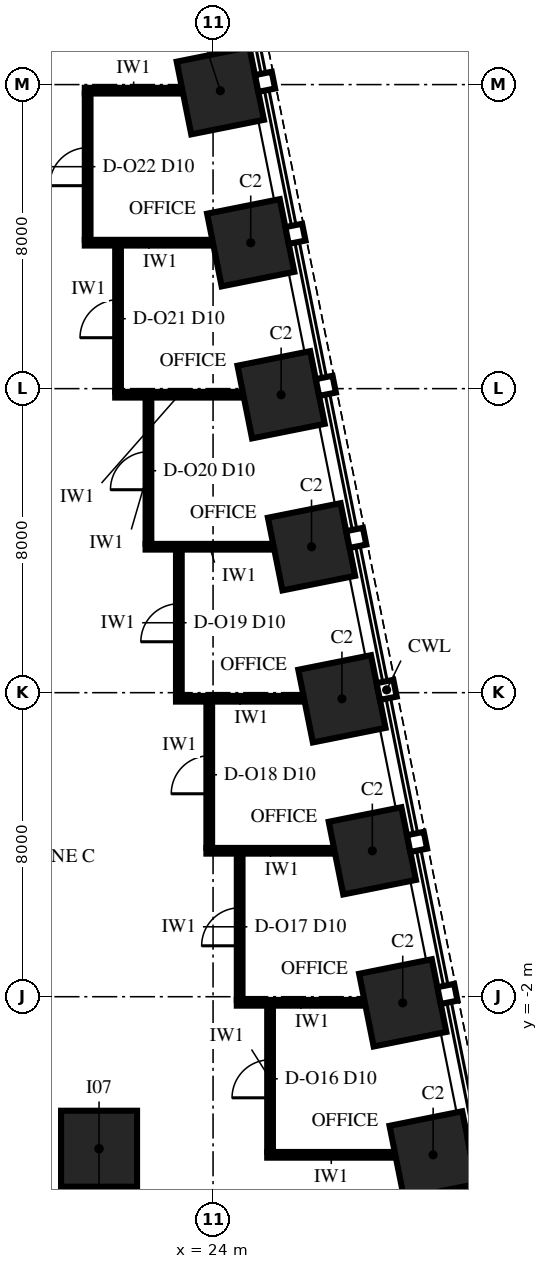
"""IFC4 building model, lengths in metres.
Left out: names, types, materials, properties, quantities, classifications, styles, units other than length and angle.
Written with IfcOpenShell. Run it as: python <this file> out.ifc"""

import sys

from ifc_helpers import new_model, si_unit, direction, frame, frame_2d, origin, origin_2d, place, context, subcontext, project, spatial, rectangle, extrude, element, fill, save


model = new_model("IFC4")
c1 = context("Model", 3, precision=1e-05, world=origin(), true_north=direction((0.0, 1.0)))
c2 = subcontext(c1, "Body", "Model", "MODEL_VIEW")
j1 = project(units=[si_unit("LENGTHUNIT", "METRE"), si_unit("PLANEANGLEUNIT", "RADIAN")], contexts=[c1])
p1 = place(None, origin())
s1 = spatial("IfcSite", under=j1, at=p1, CompositionType="ELEMENT")
p2 = place(p1, origin())
s2 = spatial("IfcBuilding", under=s1, at=p2, CompositionType="ELEMENT")
p3 = place(p2, frame((0.0, 0.0, 88.0)))
s3 = spatial("IfcBuildingStorey", under=s2, at=p3, CompositionType="ELEMENT", Elevation=88.0)
for number, where, z_axis, x_axis in (
    (1, (29.791, -6.162, 0.0), (0.0, 0.0, 1.0), (-0.196, 0.981, 0.0)),
    (2, (28.991, -2.162, 0.0), (0.0, 0.0, 1.0), (-0.196, 0.981, 0.0)),
    (3, (28.191, 1.838, 0.0), (0.0, 0.0, 1.0), (-0.196, 0.981, 0.0)),
    (4, (27.391, 5.838, 0.0), (0.0, 0.0, 1.0), (-0.196, 0.981, 0.0)),
    (5, (26.591, 9.838, 0.0), (0.0, 0.0, 1.0), (-0.196, 0.981, 0.0)),
    (6, (25.791, 13.838, 0.0), (0.0, 0.0, 1.0), (-0.196, 0.981, 0.0)),
    (7, (24.991, 17.838, 0.0), (0.0, 0.0, 1.0), (-0.196, 0.981, 0.0)),
    (8, (24.191, 21.838, 0.0), (0.0, 0.0, 1.0), (-0.196, 0.981, 0.0)),
):
    element("IfcColumn", number, at=place(p3, frame(where, z_axis=z_axis, x_axis=x_axis)), inside=s3, PredefinedType="COLUMN", context=c2, shape_type="SweptSolid", body=[
        extrude(rectangle(XDim=1.95, YDim=1.95, at=origin_2d()), origin(), (0.0, 0.0, 1.0), 4.0),
    ])
p4 = place(p3, frame((21.0, -6.0, 0.0), z_axis=(0.0, 0.0, 1.0), x_axis=(1.0, 0.0, 0.0)))
e9 = element("IfcColumn", 9, at=p4, inside=s3, PredefinedType="COLUMN", context=c2, shape_type="SweptSolid", body=[
    extrude(rectangle(XDim=2.0, YDim=2.0, at=origin_2d()), origin(), (0.0, 0.0, 1.0), 4.0),
])
p5 = place(p3, frame((25.425, -6.16, 0.0), z_axis=(0.0, 0.0, 1.0), x_axis=(1.0, 0.0, 0.0)))
e10 = element("IfcWall", 10, at=p5, inside=s3, PredefinedType="PARTITIONING", context=c2, shape_type="SweptSolid", body=[
    extrude(rectangle(XDim=3.371, YDim=0.15, at=frame_2d((1.686, 0.0))), origin(), (0.0, 0.0, 1.0), 2.742),
])
for number, where, z_axis, x_axis in (
    (11, (24.625, -2.16, 0.0), (0.0, 0.0, 1.0), (1.0, 0.0, 0.0)),
    (12, (23.825, 1.84, 0.0), (0.0, 0.0, 1.0), (1.0, 0.0, 0.0)),
):
    element("IfcWall", number, at=place(p3, frame(where, z_axis=z_axis, x_axis=x_axis)), inside=s3, PredefinedType="PARTITIONING", context=c2, shape_type="SweptSolid", body=[
        extrude(rectangle(XDim=3.371, YDim=0.15, at=frame_2d((1.686, 0.0))), origin(), (0.0, 0.0, 1.0), 3.13),
    ])
p6 = place(p3, frame((23.025, 5.84, 0.0), z_axis=(0.0, 0.0, 1.0), x_axis=(1.0, 0.0, 0.0)))
e13 = element("IfcWall", 13, at=p6, inside=s3, PredefinedType="PARTITIONING", context=c2, shape_type="SweptSolid", body=[
    extrude(rectangle(XDim=3.372, YDim=0.15, at=frame_2d((1.686, 0.0))), origin(), (0.0, 0.0, 1.0), 2.742),
])
for number, where, z_axis, x_axis in (
    (14, (22.225, 9.84, 0.0), (0.0, 0.0, 1.0), (1.0, 0.0, 0.0)),
    (15, (21.425, 13.84, 0.0), (0.0, 0.0, 1.0), (1.0, 0.0, 0.0)),
    (16, (20.625, 17.84, 0.0), (0.0, 0.0, 1.0), (1.0, 0.0, 0.0)),
):
    element("IfcWall", number, at=place(p3, frame(where, z_axis=z_axis, x_axis=x_axis)), inside=s3, PredefinedType="PARTITIONING", context=c2, shape_type="SweptSolid", body=[
        extrude(rectangle(XDim=3.371, YDim=0.15, at=frame_2d((1.686, 0.0))), origin(), (0.0, 0.0, 1.0), 3.13),
    ])
p7 = place(p3, frame((20.625, 21.84, 0.0), z_axis=(0.0, 0.0, 1.0), x_axis=(1.0, 0.0, 0.0)))
e17 = element("IfcWall", 17, at=p7, inside=s3, PredefinedType="PARTITIONING", context=c2, shape_type="SweptSolid", body=[
    extrude(rectangle(XDim=2.571, YDim=0.15, at=frame_2d((1.286, 0.0))), origin(), (0.0, 0.0, 1.0), 3.13),
])
p8 = place(p3, frame((20.7, 17.915, 0.0), z_axis=(0.0, 0.0, 1.0), x_axis=(0.0, 1.0, 0.0)))
e18 = element("IfcWall", 18, at=p8, inside=s3, PredefinedType="PARTITIONING", context=c2, shape_type="SweptSolid", body=[
    extrude(rectangle(XDim=3.85, YDim=0.15, at=frame_2d((1.925, 0.0))), origin(), (0.0, 0.0, 1.0), 3.13),
])
p9 = place(p8, frame((1.425, 0.0, 0.0)))
e19 = element("IfcOpeningElement", 19, at=p9, cuts=e18, PredefinedType="OPENING", context=c2, shape_type="SweptSolid", body=[
    extrude(rectangle(XDim=1.0, YDim=2.3, at=frame_2d((0.5, 1.15))), frame((0.0, 0.09, 0.0), z_axis=(0.0, -1.0, 0.0), x_axis=(1.0, 0.0, 0.0)), (0.0, 0.0, 1.0), 0.18),
])
p10 = place(p3, frame((21.5, 13.915, 0.0), z_axis=(0.0, 0.0, 1.0), x_axis=(0.0, 1.0, 0.0)))
e20 = element("IfcWall", 20, at=p10, inside=s3, PredefinedType="PARTITIONING", context=c2, shape_type="SweptSolid", body=[
    extrude(rectangle(XDim=3.85, YDim=0.15, at=frame_2d((1.925, 0.0))), origin(), (0.0, 0.0, 1.0), 3.13),
])
p11 = place(p10, frame((1.425, 0.0, 0.0)))
e21 = element("IfcOpeningElement", 21, at=p11, cuts=e20, PredefinedType="OPENING", context=c2, shape_type="SweptSolid", body=[
    extrude(rectangle(XDim=1.0, YDim=2.3, at=frame_2d((0.5, 1.15))), frame((0.0, 0.09, 0.0), z_axis=(0.0, -1.0, 0.0), x_axis=(1.0, 0.0, 0.0)), (0.0, 0.0, 1.0), 0.18),
])
p12 = place(p3, frame((22.3, 9.915, 0.0), z_axis=(0.0, 0.0, 1.0), x_axis=(0.0, 1.0, 0.0)))
e22 = element("IfcWall", 22, at=p12, inside=s3, PredefinedType="PARTITIONING", context=c2, shape_type="SweptSolid", body=[
    extrude(rectangle(XDim=3.85, YDim=0.15, at=frame_2d((1.925, 0.0))), origin(), (0.0, 0.0, 1.0), 3.75),
])
p13 = place(p12, frame((1.425, 0.0, 0.0)))
e23 = element("IfcOpeningElement", 23, at=p13, cuts=e22, PredefinedType="OPENING", context=c2, shape_type="SweptSolid", body=[
    extrude(rectangle(XDim=1.0, YDim=2.3, at=frame_2d((0.5, 1.15))), frame((0.0, 0.09, 0.0), z_axis=(0.0, -1.0, 0.0), x_axis=(1.0, 0.0, 0.0)), (0.0, 0.0, 1.0), 0.18),
])
p14 = place(p3, frame((23.1, 5.915, 0.0), z_axis=(0.0, 0.0, 1.0), x_axis=(0.0, 1.0, 0.0)))
e24 = element("IfcWall", 24, at=p14, inside=s3, PredefinedType="PARTITIONING", context=c2, shape_type="SweptSolid", body=[
    extrude(rectangle(XDim=3.85, YDim=0.15, at=frame_2d((1.925, 0.0))), origin(), (0.0, 0.0, 1.0), 2.742),
])
p15 = place(p14, frame((1.425, 0.0, 0.0)))
e25 = element("IfcOpeningElement", 25, at=p15, cuts=e24, PredefinedType="OPENING", context=c2, shape_type="SweptSolid", body=[
    extrude(rectangle(XDim=1.0, YDim=2.3, at=frame_2d((0.5, 1.15))), frame((0.0, 0.09, 0.0), z_axis=(0.0, -1.0, 0.0), x_axis=(1.0, 0.0, 0.0)), (0.0, 0.0, 1.0), 0.18),
])
p16 = place(p3, frame((23.9, 1.915, 0.0), z_axis=(0.0, 0.0, 1.0), x_axis=(0.0, 1.0, 0.0)))
e26 = element("IfcWall", 26, at=p16, inside=s3, PredefinedType="PARTITIONING", context=c2, shape_type="SweptSolid", body=[
    extrude(rectangle(XDim=3.85, YDim=0.15, at=frame_2d((1.925, 0.0))), origin(), (0.0, 0.0, 1.0), 3.75),
])
p17 = place(p16, frame((1.425, 0.0, 0.0)))
e27 = element("IfcOpeningElement", 27, at=p17, cuts=e26, PredefinedType="OPENING", context=c2, shape_type="SweptSolid", body=[
    extrude(rectangle(XDim=1.0, YDim=2.3, at=frame_2d((0.5, 1.15))), frame((0.0, 0.09, 0.0), z_axis=(0.0, -1.0, 0.0), x_axis=(1.0, 0.0, 0.0)), (0.0, 0.0, 1.0), 0.18),
])
p18 = place(p3, frame((24.7, -2.085, 0.0), z_axis=(0.0, 0.0, 1.0), x_axis=(0.0, 1.0, 0.0)))
e28 = element("IfcWall", 28, at=p18, inside=s3, PredefinedType="PARTITIONING", context=c2, shape_type="SweptSolid", body=[
    extrude(rectangle(XDim=3.85, YDim=0.15, at=frame_2d((1.925, 0.0))), origin(), (0.0, 0.0, 1.0), 3.75),
])
p19 = place(p18, frame((1.425, 0.0, 0.0)))
e29 = element("IfcOpeningElement", 29, at=p19, cuts=e28, PredefinedType="OPENING", context=c2, shape_type="SweptSolid", body=[
    extrude(rectangle(XDim=1.0, YDim=2.3, at=frame_2d((0.5, 1.15))), frame((0.0, 0.09, 0.0), z_axis=(0.0, -1.0, 0.0), x_axis=(1.0, 0.0, 0.0)), (0.0, 0.0, 1.0), 0.18),
])
p20 = place(p3, frame((25.5, -6.085, 0.0), z_axis=(0.0, 0.0, 1.0), x_axis=(0.0, 1.0, 0.0)))
e30 = element("IfcWall", 30, at=p20, inside=s3, PredefinedType="PARTITIONING", context=c2, shape_type="SweptSolid", body=[
    extrude(rectangle(XDim=3.85, YDim=0.15, at=frame_2d((1.925, 0.0))), origin(), (0.0, 0.0, 1.0), 2.742),
])
p21 = place(p20, frame((1.425, 0.0, 0.0)))
e31 = element("IfcOpeningElement", 31, at=p21, cuts=e30, PredefinedType="OPENING", context=c2, shape_type="SweptSolid", body=[
    extrude(rectangle(XDim=1.0, YDim=2.3, at=frame_2d((0.5, 1.15))), frame((0.0, 0.09, 0.0), z_axis=(0.0, -1.0, 0.0), x_axis=(1.0, 0.0, 0.0)), (0.0, 0.0, 1.0), 0.18),
])
p22 = place(p21, origin())
e32 = element("IfcDoor", 32, at=p22, inside=s3, OperationType="SINGLE_SWING_LEFT", PredefinedType="DOOR", context=c2, shape_type="SweptSolid", body=[
    extrude(rectangle(XDim=1.0, YDim=2.3, at=frame_2d((0.5, 1.15))), frame((0.0, 0.075, 0.0), z_axis=(0.0, -1.0, 0.0), x_axis=(1.0, 0.0, 0.0)), (0.0, 0.0, 1.0), 0.149),
])
fill(e31, e32)
p23 = place(p19, origin())
e33 = element("IfcDoor", 33, at=p23, inside=s3, OperationType="SINGLE_SWING_LEFT", PredefinedType="DOOR", context=c2, shape_type="SweptSolid", body=[
    extrude(rectangle(XDim=1.0, YDim=2.3, at=frame_2d((0.5, 1.15))), frame((0.0, 0.075, 0.0), z_axis=(0.0, -1.0, 0.0), x_axis=(1.0, 0.0, 0.0)), (0.0, 0.0, 1.0), 0.149),
])
fill(e29, e33)
p24 = place(p17, origin())
e34 = element("IfcDoor", 34, at=p24, inside=s3, OperationType="SINGLE_SWING_LEFT", PredefinedType="DOOR", context=c2, shape_type="SweptSolid", body=[
    extrude(rectangle(XDim=1.0, YDim=2.3, at=frame_2d((0.5, 1.15))), frame((0.0, 0.075, 0.0), z_axis=(0.0, -1.0, 0.0), x_axis=(1.0, 0.0, 0.0)), (0.0, 0.0, 1.0), 0.149),
])
fill(e27, e34)
p25 = place(p15, origin())
e35 = element("IfcDoor", 35, at=p25, inside=s3, OperationType="SINGLE_SWING_LEFT", PredefinedType="DOOR", context=c2, shape_type="SweptSolid", body=[
    extrude(rectangle(XDim=1.0, YDim=2.3, at=frame_2d((0.5, 1.15))), frame((0.0, 0.075, 0.0), z_axis=(0.0, -1.0, 0.0), x_axis=(1.0, 0.0, 0.0)), (0.0, 0.0, 1.0), 0.149),
])
fill(e25, e35)
p26 = place(p13, origin())
e36 = element("IfcDoor", 36, at=p26, inside=s3, OperationType="SINGLE_SWING_LEFT", PredefinedType="DOOR", context=c2, shape_type="SweptSolid", body=[
    extrude(rectangle(XDim=1.0, YDim=2.3, at=frame_2d((0.5, 1.15))), frame((0.0, 0.075, 0.0), z_axis=(0.0, -1.0, 0.0), x_axis=(1.0, 0.0, 0.0)), (0.0, 0.0, 1.0), 0.149),
])
fill(e23, e36)
p27 = place(p11, origin())
e37 = element("IfcDoor", 37, at=p27, inside=s3, OperationType="SINGLE_SWING_LEFT", PredefinedType="DOOR", context=c2, shape_type="SweptSolid", body=[
    extrude(rectangle(XDim=1.0, YDim=2.3, at=frame_2d((0.5, 1.15))), frame((0.0, 0.075, 0.0), z_axis=(0.0, -1.0, 0.0), x_axis=(1.0, 0.0, 0.0)), (0.0, 0.0, 1.0), 0.149),
])
fill(e21, e37)
p28 = place(p9, origin())
e38 = element("IfcDoor", 38, at=p28, inside=s3, OperationType="SINGLE_SWING_LEFT", PredefinedType="DOOR", context=c2, shape_type="SweptSolid", body=[
    extrude(rectangle(XDim=1.0, YDim=2.3, at=frame_2d((0.5, 1.15))), frame((0.0, 0.075, 0.0), z_axis=(0.0, -1.0, 0.0), x_axis=(1.0, 0.0, 0.0)), (0.0, 0.0, 1.0), 0.149),
])
fill(e19, e38)
save(model, sys.argv[1])
